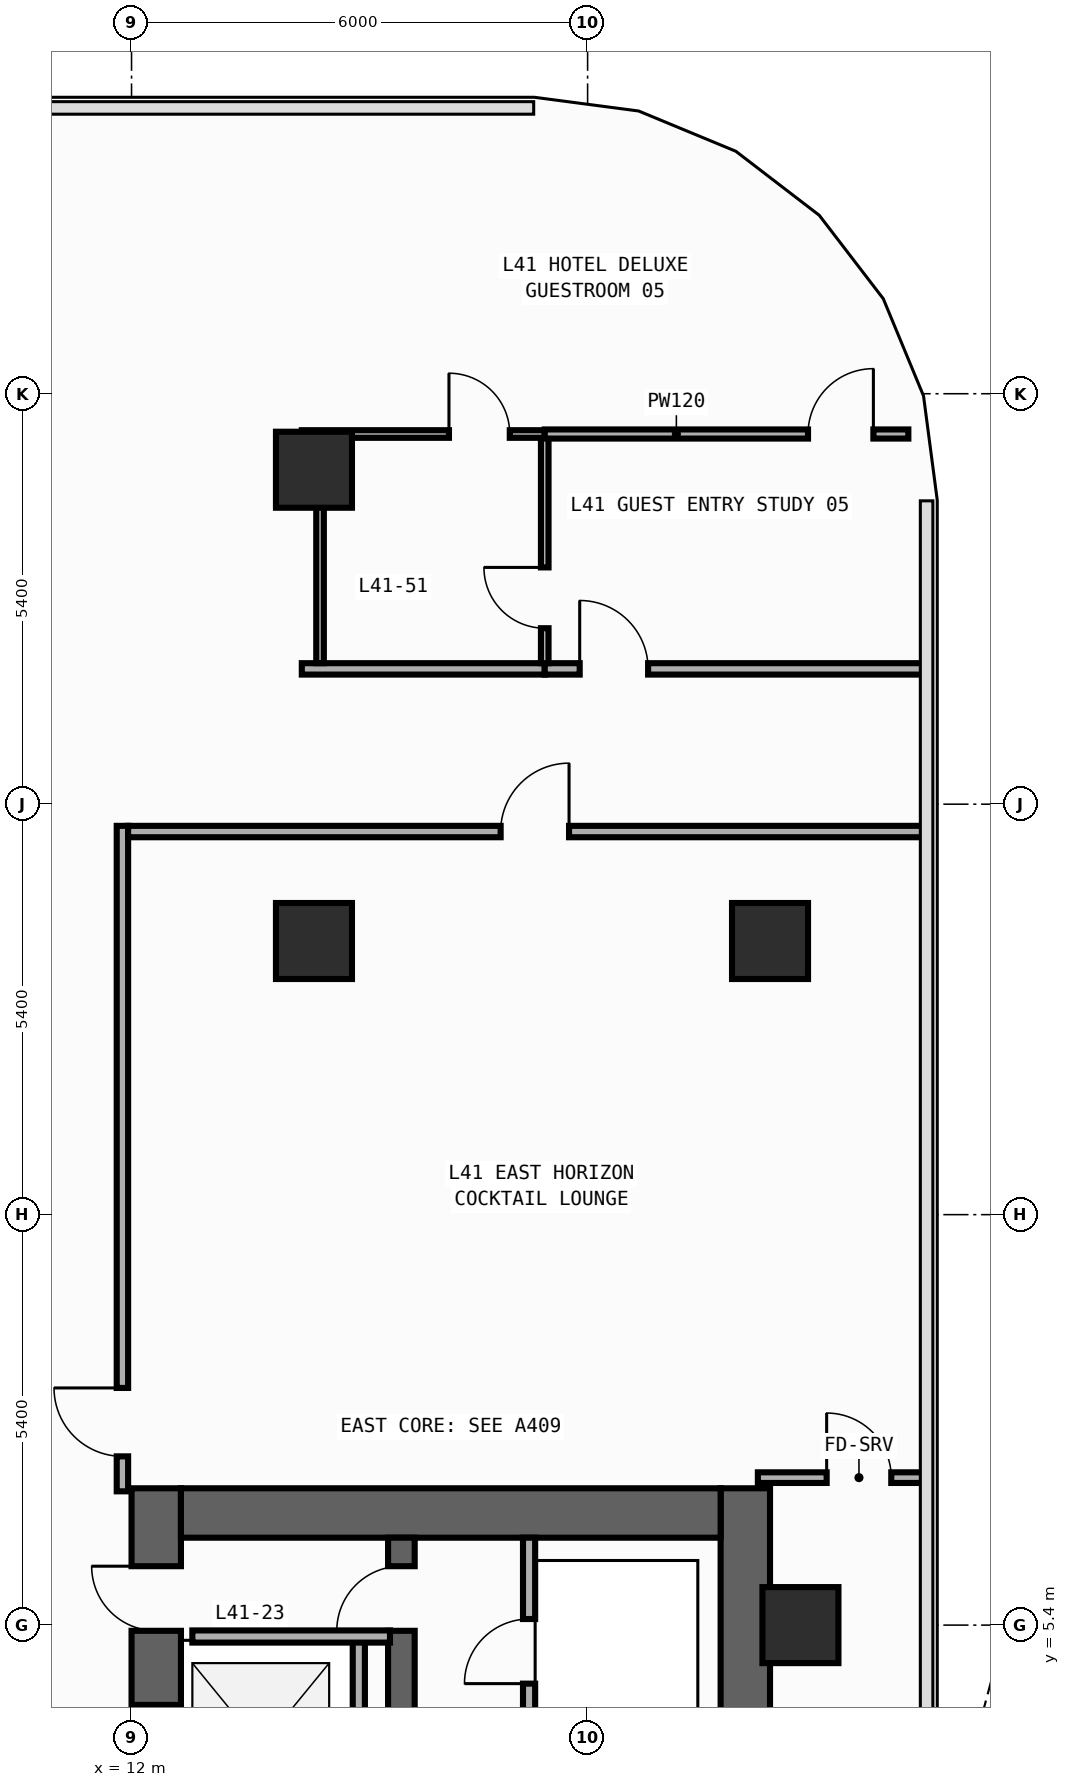
"""IFC4 building model, lengths in metres.
Left out: names, types, materials, properties, quantities, classifications, styles, units other than length and angle.
Written with IfcOpenShell. Run it as: python <this file> out.ifc"""

import sys

from ifc_helpers import new_model, si_unit, direction, frame, frame_2d, origin, origin_2d, place, context, subcontext, project, spatial, rectangle, extrude, element, fill, save


model = new_model("IFC4")
c1 = context("Model", 3, precision=1e-05, world=origin(), true_north=direction((0.0, 1.0)))
c2 = subcontext(c1, "Body", "Model", "MODEL_VIEW")
j1 = project(units=[si_unit("LENGTHUNIT", "METRE"), si_unit("PLANEANGLEUNIT", "RADIAN")], contexts=[c1])
p1 = place(None, origin())
s1 = spatial("IfcSite", under=j1, at=p1, CompositionType="ELEMENT")
p2 = place(p1, origin())
s2 = spatial("IfcBuilding", under=s1, at=p2, CompositionType="ELEMENT")
p3 = place(p2, frame((0.0, 0.0, 180.2)))
s3 = spatial("IfcBuildingStorey", under=s2, at=p3, CompositionType="ELEMENT", Elevation=180.2)
p4 = place(p3, frame((12.325, -19.8, 0.0), z_axis=(0.0, 0.0, 1.0), x_axis=(0.0, 1.0, 0.0)))
e1 = element("IfcWall", 1, at=p4, inside=s3, PredefinedType="SHEAR", context=c2, shape_type="SweptSolid", body=[
    extrude(rectangle(XDim=27.0, YDim=0.65, at=frame_2d((13.5, 0.0))), origin(), (0.0, 0.0, 1.0), 3.54),
])
p5 = place(p4, frame((23.05, 0.0, 0.0)))
e2 = element("IfcOpeningElement", 2, at=p5, cuts=e1, PredefinedType="OPENING", context=c2, shape_type="SweptSolid", body=[
    extrude(rectangle(XDim=1.1, YDim=2.2, at=frame_2d((0.55, 1.1))), frame((0.0, 0.335, 0.0), z_axis=(0.0, -1.0, 0.0), x_axis=(1.0, 0.0, 0.0)), (0.0, 0.0, 1.0), 0.67),
])
p6 = place(p4, frame((19.85, 0.0, 0.0)))
e3 = element("IfcOpeningElement", 3, at=p6, cuts=e1, PredefinedType="OPENING", context=c2, shape_type="SweptSolid", body=[
    extrude(rectangle(XDim=1.1, YDim=2.2, at=frame_2d((0.55, 1.1))), frame((0.0, 0.335, 0.0), z_axis=(0.0, -1.0, 0.0), x_axis=(1.0, 0.0, 0.0)), (0.0, 0.0, 1.0), 0.67),
])
p7 = place(p4, frame((16.65, 0.0, 0.0)))
e4 = element("IfcOpeningElement", 4, at=p7, cuts=e1, PredefinedType="OPENING", context=c2, shape_type="SweptSolid", body=[
    extrude(rectangle(XDim=1.1, YDim=2.2, at=frame_2d((0.55, 1.1))), frame((0.0, 0.335, 0.0), z_axis=(0.0, -1.0, 0.0), x_axis=(1.0, 0.0, 0.0)), (0.0, 0.0, 1.0), 0.67),
])
p8 = place(p4, frame((10.175, 0.0, 0.0)))
e5 = element("IfcOpeningElement", 5, at=p8, cuts=e1, PredefinedType="OPENING", context=c2, shape_type="SweptSolid", body=[
    extrude(rectangle(XDim=0.85, YDim=2.1, at=frame_2d((0.425, 1.05))), frame((0.0, 0.335, 0.0), z_axis=(0.0, -1.0, 0.0), x_axis=(1.0, 0.0, 0.0)), (0.0, 0.0, 1.0), 0.67),
])
p9 = place(p4, frame((12.725, 0.0, 0.0)))
e6 = element("IfcOpeningElement", 6, at=p9, cuts=e1, PredefinedType="OPENING", context=c2, shape_type="SweptSolid", body=[
    extrude(rectangle(XDim=1.15, YDim=2.2, at=frame_2d((0.575, 1.1))), frame((0.0, 0.335, 0.0), z_axis=(0.0, -1.0, 0.0), x_axis=(1.0, 0.0, 0.0)), (0.0, 0.0, 1.0), 0.67),
])
p10 = place(p4, frame((25.125, 0.0, 0.0)))
e7 = element("IfcOpeningElement", 7, at=p10, cuts=e1, PredefinedType="OPENING", context=c2, shape_type="SweptSolid", body=[
    extrude(rectangle(XDim=0.85, YDim=2.1, at=frame_2d((0.425, 1.05))), frame((0.0, 0.335, 0.0), z_axis=(0.0, -1.0, 0.0), x_axis=(1.0, 0.0, 0.0)), (0.0, 0.0, 1.0), 0.67),
])
p11 = place(p3, frame((20.075, -19.8, 0.0), z_axis=(0.0, 0.0, 1.0), x_axis=(0.0, 1.0, 0.0)))
e8 = element("IfcWall", 8, at=p11, inside=s3, PredefinedType="SHEAR", context=c2, shape_type="SweptSolid", body=[
    extrude(rectangle(XDim=27.0, YDim=0.65, at=frame_2d((13.5, 0.0))), origin(), (0.0, 0.0, 1.0), 3.54),
])
p12 = place(p3, frame((12.65, 6.875, 0.0), z_axis=(0.0, 0.0, 1.0), x_axis=(1.0, 0.0, 0.0)))
e9 = element("IfcWall", 9, at=p12, inside=s3, PredefinedType="SHEAR", context=c2, shape_type="SweptSolid", body=[
    extrude(rectangle(XDim=7.1, YDim=0.65, at=frame_2d((3.55, 0.0))), origin(), (0.0, 0.0, 1.0), 3.54),
])
p13 = place(p3, frame((15.55, -19.15, 0.0), z_axis=(0.0, 0.0, 1.0), x_axis=(0.0, 1.0, 0.0)))
e10 = element("IfcWall", 10, at=p13, inside=s3, PredefinedType="SHEAR", context=c2, shape_type="SweptSolid", body=[
    extrude(rectangle(XDim=25.7, YDim=0.35, at=frame_2d((12.85, 0.0))), origin(), (0.0, 0.0, 1.0), 3.54),
])
p14 = place(p13, frame((12.075, 0.0, 0.0)))
e11 = element("IfcOpeningElement", 11, at=p14, cuts=e10, PredefinedType="OPENING", context=c2, shape_type="SweptSolid", body=[
    extrude(rectangle(XDim=1.15, YDim=2.2, at=frame_2d((0.575, 1.1))), frame((0.0, 0.185, 0.0), z_axis=(0.0, -1.0, 0.0), x_axis=(1.0, 0.0, 0.0)), (0.0, 0.0, 1.0), 0.37),
])
p15 = place(p13, frame((24.475, 0.0, 0.0)))
e12 = element("IfcOpeningElement", 12, at=p15, cuts=e10, PredefinedType="OPENING", context=c2, shape_type="SweptSolid", body=[
    extrude(rectangle(XDim=0.85, YDim=2.1, at=frame_2d((0.425, 1.05))), frame((0.0, 0.185, 0.0), z_axis=(0.0, -1.0, 0.0), x_axis=(1.0, 0.0, 0.0)), (0.0, 0.0, 1.0), 0.37),
])
for number, where, z_axis, x_axis in (
    (13, (20.4, 14.4, 0.0), (0.0, 0.0, 1.0), (1.0, 0.0, 0.0)),
    (14, (14.4, 14.4, 0.0), (0.0, 0.0, 1.0), (1.0, 0.0, 0.0)),
    (15, (20.8, 5.4, 0.0), (0.0, 0.0, 1.0), (1.0, 0.0, 0.0)),
    (16, (14.4, 20.6, 0.0), (0.0, 0.0, 1.0), (1.0, 0.0, 0.0)),
):
    element("IfcColumn", number, at=place(p3, frame(where, z_axis=z_axis, x_axis=x_axis)), inside=s3, PredefinedType="COLUMN", context=c2, shape_type="SweptSolid", body=[
        extrude(rectangle(XDim=1.0, YDim=1.0, at=origin_2d()), origin(), (0.0, 0.0, 1.0), 3.8),
    ])
p16 = place(p3, frame((14.99, 2.4, 0.0), z_axis=(0.0, 0.0, 1.0), x_axis=(0.0, 1.0, 0.0)))
e17 = element("IfcWall", 17, at=p16, inside=s3, PredefinedType="STANDARD", context=c2, shape_type="SweptSolid", body=[
    extrude(rectangle(XDim=2.8, YDim=0.16, at=frame_2d((1.4, 0.0))), origin(), (0.0, 0.0, 1.0), 3.54),
])
p17 = place(p3, frame((12.8, 5.25, 0.0), z_axis=(0.0, 0.0, 1.0), x_axis=(1.0, 0.0, 0.0)))
e18 = element("IfcWall", 18, at=p17, inside=s3, PredefinedType="STANDARD", context=c2, shape_type="SweptSolid", body=[
    extrude(rectangle(XDim=2.6, YDim=0.16, at=frame_2d((1.3, 0.0))), origin(), (0.0, 0.0, 1.0), 3.54),
])
p18 = place(p3, frame((17.23, 4.17, 0.0), z_axis=(0.0, 0.0, 1.0), x_axis=(0.0, 1.0, 0.0)))
e19 = element("IfcWall", 19, at=p18, inside=s3, PredefinedType="PARTITIONING", context=c2, shape_type="SweptSolid", body=[
    extrude(rectangle(XDim=2.38, YDim=0.16, at=frame_2d((1.19, 0.0))), origin(), (0.0, 0.0, 1.0), 3.54),
])
p19 = place(p18, frame((0.46, 0.0, 0.0)))
e20 = element("IfcOpeningElement", 20, at=p19, cuts=e19, PredefinedType="OPENING", context=c2, shape_type="SweptSolid", body=[
    extrude(rectangle(XDim=0.85, YDim=2.1, at=frame_2d((0.425, 1.05))), frame((0.0, 0.09, 0.0), z_axis=(0.0, -1.0, 0.0), x_axis=(1.0, 0.0, 0.0)), (0.0, 0.0, 1.0), 0.18),
])
p20 = place(p3, frame((11.88, 7.16, 0.0), z_axis=(0.0, 0.0, 1.0), x_axis=(0.0, 1.0, 0.0)))
e21 = element("IfcWall", 21, at=p20, inside=s3, PredefinedType="PARTITIONING", context=c2, shape_type="SweptSolid", body=[
    extrude(rectangle(XDim=8.755, YDim=0.15, at=frame_2d((4.377, 0.0))), origin(), (0.0, 0.0, 1.0), 3.54),
])
p21 = place(p20, frame((0.46, 0.0, 0.0)))
e22 = element("IfcOpeningElement", 22, at=p21, cuts=e21, PredefinedType="OPENING", context=c2, shape_type="SweptSolid", body=[
    extrude(rectangle(XDim=0.9, YDim=2.15, at=frame_2d((0.45, 1.075))), frame((0.0, 0.085, 0.0), z_axis=(0.0, -1.0, 0.0), x_axis=(1.0, 0.0, 0.0)), (0.0, 0.0, 1.0), 0.17),
])
p22 = place(p3, frame((14.24, 17.98, 0.0), z_axis=(0.0, 0.0, 1.0), x_axis=(1.0, 0.0, 0.0)))
e23 = element("IfcWall", 23, at=p22, inside=s3, PredefinedType="PARTITIONING", context=c2, shape_type="SweptSolid", body=[
    extrude(rectangle(XDim=3.196, YDim=0.15, at=frame_2d((1.598, 0.0))), origin(), (0.0, 0.0, 1.0), 3.54),
])
p23 = place(p3, frame((17.436, 17.98, 0.0), z_axis=(0.0, 0.0, 1.0), x_axis=(1.0, 0.0, 0.0)))
e24 = element("IfcWall", 24, at=p23, inside=s3, PredefinedType="PARTITIONING", context=c2, shape_type="SweptSolid", body=[
    extrude(rectangle(XDim=5.019, YDim=0.15, at=frame_2d((2.51, 0.0))), origin(), (0.0, 0.0, 1.0), 3.54),
])
p24 = place(p23, frame((0.46, 0.0, 0.0)))
e25 = element("IfcOpeningElement", 25, at=p24, cuts=e24, PredefinedType="OPENING", context=c2, shape_type="SweptSolid", body=[
    extrude(rectangle(XDim=0.9, YDim=2.15, at=frame_2d((0.45, 1.075))), frame((0.0, 0.085, 0.0), z_axis=(0.0, -1.0, 0.0), x_axis=(1.0, 0.0, 0.0)), (0.0, 0.0, 1.0), 0.17),
])
p25 = place(p3, frame((11.955, 15.84, 0.0), z_axis=(0.0, 0.0, 1.0), x_axis=(1.0, 0.0, 0.0)))
e26 = element("IfcWall", 26, at=p25, inside=s3, PredefinedType="PARTITIONING", context=c2, shape_type="SweptSolid", body=[
    extrude(rectangle(XDim=10.5, YDim=0.15, at=frame_2d((5.25, 0.0))), origin(), (0.0, 0.0, 1.0), 3.54),
])
p26 = place(p25, frame((4.901, 0.0, 0.0)))
e27 = element("IfcOpeningElement", 27, at=p26, cuts=e26, PredefinedType="OPENING", context=c2, shape_type="SweptSolid", body=[
    extrude(rectangle(XDim=0.9, YDim=2.15, at=frame_2d((0.45, 1.075))), frame((0.0, 0.085, 0.0), z_axis=(0.0, -1.0, 0.0), x_axis=(1.0, 0.0, 0.0)), (0.0, 0.0, 1.0), 0.17),
])
p27 = place(p3, frame((17.436, 18.055, 0.0), z_axis=(0.0, 0.0, 1.0), x_axis=(0.0, 1.0, 0.0)))
e28 = element("IfcWall", 28, at=p27, inside=s3, PredefinedType="PARTITIONING", context=c2, shape_type="SweptSolid", body=[
    extrude(rectangle(XDim=2.965, YDim=0.1, at=frame_2d((1.482, 0.0))), origin(), (0.0, 0.0, 1.0), 3.54),
])
p28 = place(p27, frame((0.46, 0.0, 0.0)))
e29 = element("IfcOpeningElement", 29, at=p28, cuts=e28, PredefinedType="OPENING", context=c2, shape_type="SweptSolid", body=[
    extrude(rectangle(XDim=0.8, YDim=2.1, at=frame_2d((0.4, 1.05))), frame((0.0, 0.06, 0.0), z_axis=(0.0, -1.0, 0.0), x_axis=(1.0, 0.0, 0.0)), (0.0, 0.0, 1.0), 0.12),
])
p29 = place(p3, frame((14.24, 21.07, 0.0), z_axis=(0.0, 0.0, 1.0), x_axis=(1.0, 0.0, 0.0)))
e30 = element("IfcWall", 30, at=p29, inside=s3, PredefinedType="PARTITIONING", context=c2, shape_type="SweptSolid", body=[
    extrude(rectangle(XDim=3.196, YDim=0.1, at=frame_2d((1.598, 0.0))), origin(), (0.0, 0.0, 1.0), 3.54),
])
p30 = place(p29, frame((1.936, 0.0, 0.0)))
e31 = element("IfcOpeningElement", 31, at=p30, cuts=e30, PredefinedType="OPENING", context=c2, shape_type="SweptSolid", body=[
    extrude(rectangle(XDim=0.8, YDim=2.1, at=frame_2d((0.4, 1.05))), frame((0.0, 0.06, 0.0), z_axis=(0.0, -1.0, 0.0), x_axis=(1.0, 0.0, 0.0)), (0.0, 0.0, 1.0), 0.12),
])
p31 = place(p3, frame((17.436, 21.07, 0.0), z_axis=(0.0, 0.0, 1.0), x_axis=(1.0, 0.0, 0.0)))
e32 = element("IfcWall", 32, at=p31, inside=s3, PredefinedType="PARTITIONING", context=c2, shape_type="SweptSolid", body=[
    extrude(rectangle(XDim=4.784, YDim=0.12, at=frame_2d((2.392, 0.0))), origin(), (0.0, 0.0, 1.0), 3.54),
])
p32 = place(p31, frame((3.464, 0.0, 0.0)))
e33 = element("IfcOpeningElement", 33, at=p32, cuts=e32, PredefinedType="OPENING", context=c2, shape_type="SweptSolid", body=[
    extrude(rectangle(XDim=0.86, YDim=2.15, at=frame_2d((0.43, 1.075))), frame((0.0, 0.07, 0.0), z_axis=(0.0, -1.0, 0.0), x_axis=(1.0, 0.0, 0.0)), (0.0, 0.0, 1.0), 0.14),
])
p33 = place(p3, frame((20.24, 7.34, 0.0), z_axis=(0.0, 0.0, 1.0), x_axis=(1.0, 0.0, 0.0)))
e34 = element("IfcWall", 34, at=p33, inside=s3, PredefinedType="PARTITIONING", context=c2, shape_type="SweptSolid", body=[
    extrude(rectangle(XDim=2.215, YDim=0.14, at=frame_2d((1.107, 0.0))), origin(), (0.0, 0.0, 1.0), 3.54),
])
p34 = place(p33, frame((0.905, 0.0, 0.0)))
e35 = element("IfcOpeningElement", 35, at=p34, cuts=e34, PredefinedType="OPENING", context=c2, shape_type="SweptSolid", body=[
    extrude(rectangle(XDim=0.85, YDim=2.1, at=frame_2d((0.425, 1.05))), frame((0.0, 0.08, 0.0), z_axis=(0.0, -1.0, 0.0), x_axis=(1.0, 0.0, 0.0)), (0.0, 0.0, 1.0), 0.16),
])
p35 = place(p3, frame((14.48, 18.055, 0.0), z_axis=(0.0, 0.0, 1.0), x_axis=(0.0, 1.0, 0.0)))
e36 = element("IfcWall", 36, at=p35, inside=s3, PredefinedType="PARTITIONING", context=c2, shape_type="SweptSolid", body=[
    extrude(rectangle(XDim=2.965, YDim=0.1, at=frame_2d((1.482, 0.0))), origin(), (0.0, 0.0, 1.0), 2.952),
])
p36 = place(p5, origin())
e37 = element("IfcDoor", 37, at=p36, inside=s3, OperationType="DOUBLE_DOOR_SLIDING", PredefinedType="DOOR", context=c2, shape_type="SweptSolid", body=[
    extrude(rectangle(XDim=1.1, YDim=2.2, at=frame_2d((0.55, 1.1))), frame((0.0, 0.025, 0.0), z_axis=(0.0, -1.0, 0.0), x_axis=(1.0, 0.0, 0.0)), (0.0, 0.0, 1.0), 0.05),
])
fill(e2, e37)
p37 = place(p10, origin())
e38 = element("IfcDoor", 38, at=p37, inside=s3, OperationType="SINGLE_SWING_RIGHT", PredefinedType="DOOR", context=c2, shape_type="SweptSolid", body=[
    extrude(rectangle(XDim=0.85, YDim=2.1, at=frame_2d((0.425, 1.05))), frame((0.0, 0.025, 0.0), z_axis=(0.0, -1.0, 0.0), x_axis=(1.0, 0.0, 0.0)), (0.0, 0.0, 1.0), 0.05),
])
fill(e7, e38)
p38 = place(p15, origin())
e39 = element("IfcDoor", 39, at=p38, inside=s3, OperationType="SINGLE_SWING_LEFT", PredefinedType="DOOR", context=c2, shape_type="SweptSolid", body=[
    extrude(rectangle(XDim=0.85, YDim=2.1, at=frame_2d((0.425, 1.05))), frame((0.0, 0.025, 0.0), z_axis=(0.0, -1.0, 0.0), x_axis=(1.0, 0.0, 0.0)), (0.0, 0.0, 1.0), 0.05),
])
fill(e12, e39)
p39 = place(p19, origin())
e40 = element("IfcDoor", 40, at=p39, inside=s3, OperationType="SINGLE_SWING_LEFT", PredefinedType="DOOR", context=c2, shape_type="SweptSolid", body=[
    extrude(rectangle(XDim=0.85, YDim=2.1, at=frame_2d((0.425, 1.05))), frame((0.0, 0.025, 0.0), z_axis=(0.0, -1.0, 0.0), x_axis=(1.0, 0.0, 0.0)), (0.0, 0.0, 1.0), 0.05),
])
fill(e20, e40)
p40 = place(p21, origin())
e41 = element("IfcDoor", 41, at=p40, inside=s3, OperationType="SINGLE_SWING_RIGHT", PredefinedType="DOOR", context=c2, shape_type="SweptSolid", body=[
    extrude(rectangle(XDim=0.9, YDim=2.15, at=frame_2d((0.45, 1.075))), frame((0.0, 0.025, 0.0), z_axis=(0.0, -1.0, 0.0), x_axis=(1.0, 0.0, 0.0)), (0.0, 0.0, 1.0), 0.05),
])
fill(e22, e41)
p41 = place(p24, origin())
e42 = element("IfcDoor", 42, at=p41, inside=s3, OperationType="SINGLE_SWING_LEFT", PredefinedType="DOOR", context=c2, shape_type="SweptSolid", body=[
    extrude(rectangle(XDim=0.9, YDim=2.15, at=frame_2d((0.45, 1.075))), frame((0.0, 0.025, 0.0), z_axis=(0.0, -1.0, 0.0), x_axis=(1.0, 0.0, 0.0)), (0.0, 0.0, 1.0), 0.05),
])
fill(e25, e42)
p42 = place(p26, origin())
e43 = element("IfcDoor", 43, at=p42, inside=s3, OperationType="SINGLE_SWING_RIGHT", PredefinedType="DOOR", context=c2, shape_type="SweptSolid", body=[
    extrude(rectangle(XDim=0.9, YDim=2.15, at=frame_2d((0.45, 1.075))), frame((0.0, 0.025, 0.0), z_axis=(0.0, -1.0, 0.0), x_axis=(1.0, 0.0, 0.0)), (0.0, 0.0, 1.0), 0.05),
])
fill(e27, e43)
p43 = place(p28, origin())
e44 = element("IfcDoor", 44, at=p43, inside=s3, OperationType="SINGLE_SWING_RIGHT", PredefinedType="DOOR", context=c2, shape_type="SweptSolid", body=[
    extrude(rectangle(XDim=0.8, YDim=2.1, at=frame_2d((0.4, 1.05))), frame((0.0, 0.025, 0.0), z_axis=(0.0, -1.0, 0.0), x_axis=(1.0, 0.0, 0.0)), (0.0, 0.0, 1.0), 0.05),
])
fill(e29, e44)
p44 = place(p30, origin())
e45 = element("IfcDoor", 45, at=p44, inside=s3, OperationType="SINGLE_SWING_LEFT", PredefinedType="DOOR", context=c2, shape_type="SweptSolid", body=[
    extrude(rectangle(XDim=0.8, YDim=2.1, at=frame_2d((0.4, 1.05))), frame((0.0, 0.025, 0.0), z_axis=(0.0, -1.0, 0.0), x_axis=(1.0, 0.0, 0.0)), (0.0, 0.0, 1.0), 0.05),
])
fill(e31, e45)
p45 = place(p32, origin())
e46 = element("IfcDoor", 46, at=p45, inside=s3, OperationType="SINGLE_SWING_RIGHT", PredefinedType="DOOR", context=c2, shape_type="SweptSolid", body=[
    extrude(rectangle(XDim=0.86, YDim=2.15, at=frame_2d((0.43, 1.075))), frame((0.0, 0.025, 0.0), z_axis=(0.0, -1.0, 0.0), x_axis=(1.0, 0.0, 0.0)), (0.0, 0.0, 1.0), 0.05),
])
fill(e33, e46)
p46 = place(p34, origin())
e47 = element("IfcDoor", 47, at=p46, inside=s3, OperationType="SINGLE_SWING_LEFT", PredefinedType="DOOR", context=c2, shape_type="SweptSolid", body=[
    extrude(rectangle(XDim=0.85, YDim=2.1, at=frame_2d((0.425, 1.05))), frame((0.0, 0.025, 0.0), z_axis=(0.0, -1.0, 0.0), x_axis=(1.0, 0.0, 0.0)), (0.0, 0.0, 1.0), 0.05),
])
fill(e35, e47)
save(model, sys.argv[1])
